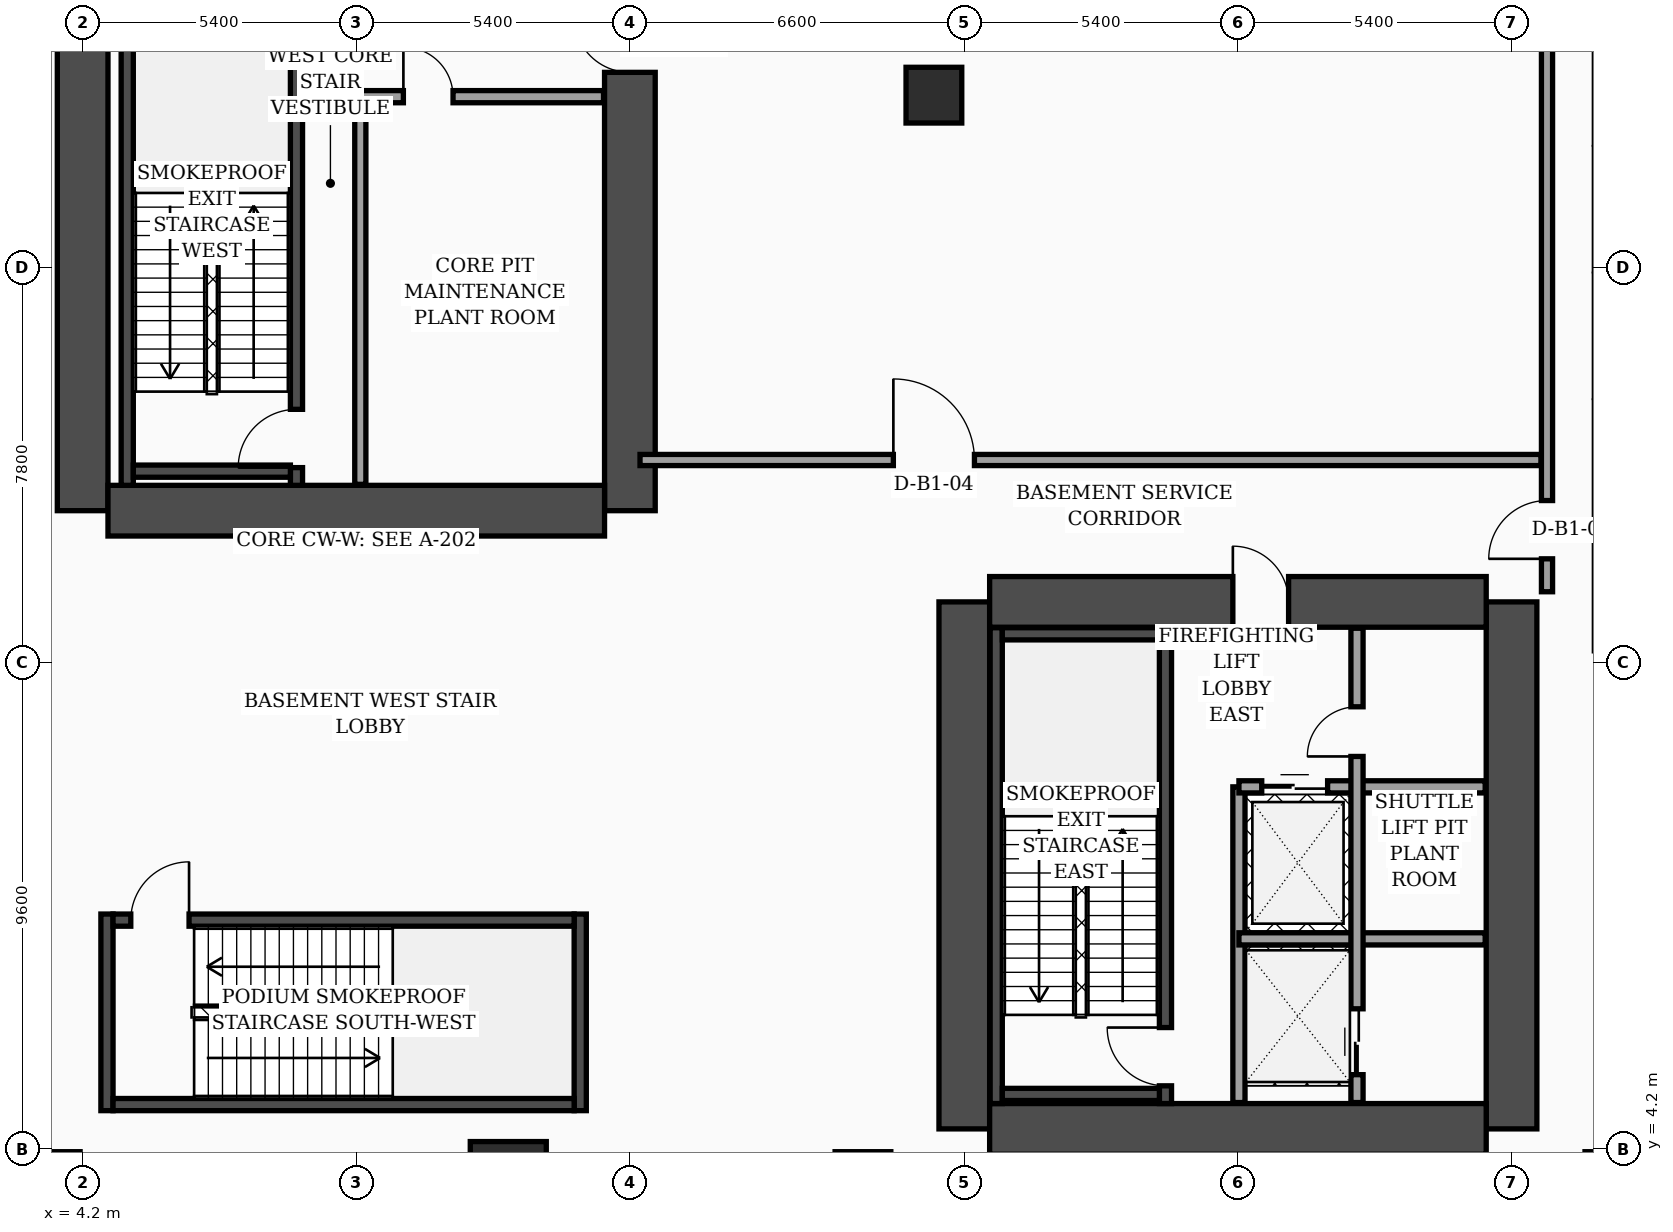
"""IFC4 building model, lengths in metres.
Left out: names, types, materials, properties, quantities, classifications, styles, units other than length and angle.
Written with IfcOpenShell. Run it as: python <this file> out.ifc"""

import sys

from ifc_helpers import new_model, si_unit, direction, frame, frame_2d, origin, origin_2d, place, context, subcontext, project, spatial, rectangle, hollow_rectangle, extrude, element, fill, save


model = new_model("IFC4")
c1 = context("Model", 3, precision=1e-05, world=origin(), true_north=direction((0.0, 1.0)))
c2 = subcontext(c1, "Body", "Model", "MODEL_VIEW")
j1 = project(units=[si_unit("LENGTHUNIT", "METRE"), si_unit("PLANEANGLEUNIT", "RADIAN")], contexts=[c1])
p1 = place(None, origin())
s1 = spatial("IfcSite", under=j1, at=p1, CompositionType="ELEMENT")
p2 = place(p1, origin())
s2 = spatial("IfcBuilding", under=s1, at=p2, CompositionType="ELEMENT")
p3 = place(p2, frame((0.0, 0.0, -5.2)))
s3 = spatial("IfcBuildingStorey", under=s2, at=p3, CompositionType="ELEMENT", Elevation=-5.2)
p4 = place(p3, frame((4.2, 16.8, 0.0), z_axis=(0.0, 0.0, 1.0), x_axis=(0.0, 1.0, 0.0)))
e1 = element("IfcWall", 1, at=p4, inside=s3, PredefinedType="SHEAR", context=c2, shape_type="SweptSolid", body=[
    extrude(rectangle(XDim=21.6, YDim=1.0, at=frame_2d((10.8, 0.0))), origin(), (0.0, 0.0, 1.0), 4.88),
])
p5 = place(p3, frame((15.0, 16.8, 0.0), z_axis=(0.0, 0.0, 1.0), x_axis=(0.0, 1.0, 0.0)))
e2 = element("IfcWall", 2, at=p5, inside=s3, PredefinedType="SHEAR", context=c2, shape_type="SweptSolid", body=[
    extrude(rectangle(XDim=21.6, YDim=1.0, at=frame_2d((10.8, 0.0))), origin(), (0.0, 0.0, 1.0), 4.88),
])
p6 = place(p5, frame((8.65, 0.0, 0.0)))
e3 = element("IfcOpeningElement", 3, at=p6, cuts=e2, PredefinedType="OPENING", context=c2, shape_type="SweptSolid", body=[
    extrude(rectangle(XDim=1.1, YDim=2.2, at=frame_2d((0.55, 1.1))), frame((0.0, 0.51, 0.0), z_axis=(0.0, -1.0, 0.0), x_axis=(1.0, 0.0, 0.0)), (0.0, 0.0, 1.0), 1.02),
])
p7 = place(p3, frame((4.7, 16.8, 0.0), z_axis=(0.0, 0.0, 1.0), x_axis=(1.0, 0.0, 0.0)))
e4 = element("IfcWall", 4, at=p7, inside=s3, PredefinedType="SHEAR", context=c2, shape_type="SweptSolid", body=[
    extrude(rectangle(XDim=9.8, YDim=1.0, at=frame_2d((4.9, 0.0))), origin(), (0.0, 0.0, 1.0), 4.88),
])
for number, where, z_axis, x_axis in (
    (5, (21.6, 4.6, 0.0), (0.0, 0.0, 1.0), (0.0, 1.0, 0.0)),
    (6, (32.4, 4.6, 0.0), (0.0, 0.0, 1.0), (0.0, 1.0, 0.0)),
):
    element("IfcWall", number, at=place(p3, frame(where, z_axis=z_axis, x_axis=x_axis)), inside=s3, PredefinedType="SHEAR", context=c2, shape_type="SweptSolid", body=[
        extrude(rectangle(XDim=10.4, YDim=1.0, at=frame_2d((5.2, 0.0))), origin(), (0.0, 0.0, 1.0), 4.88),
    ])
p8 = place(p3, frame((22.1, 15.0, 0.0), z_axis=(0.0, 0.0, 1.0), x_axis=(1.0, 0.0, 0.0)))
e7 = element("IfcWall", 7, at=p8, inside=s3, PredefinedType="SHEAR", context=c2, shape_type="SweptSolid", body=[
    extrude(rectangle(XDim=9.8, YDim=1.0, at=frame_2d((4.9, 0.0))), origin(), (0.0, 0.0, 1.0), 4.88),
])
p9 = place(p8, frame((4.8, 0.0, 0.0)))
e8 = element("IfcOpeningElement", 8, at=p9, cuts=e7, PredefinedType="OPENING", context=c2, shape_type="SweptSolid", body=[
    extrude(rectangle(XDim=1.1, YDim=2.2, at=frame_2d((0.55, 1.1))), frame((0.0, 0.51, 0.0), z_axis=(0.0, -1.0, 0.0), x_axis=(1.0, 0.0, 0.0)), (0.0, 0.0, 1.0), 1.02),
])
p10 = place(p3, frame((22.1, 4.6, 0.0), z_axis=(0.0, 0.0, 1.0), x_axis=(1.0, 0.0, 0.0)))
e9 = element("IfcWall", 9, at=p10, inside=s3, PredefinedType="SHEAR", context=c2, shape_type="SweptSolid", body=[
    extrude(rectangle(XDim=9.8, YDim=1.0, at=frame_2d((4.9, 0.0))), origin(), (0.0, 0.0, 1.0), 4.88),
])
p11 = place(p3, frame((5.08, 17.3, 0.0), z_axis=(0.0, 0.0, 1.0), x_axis=(0.0, 1.0, 0.0)))
e10 = element("IfcWall", 10, at=p11, inside=s3, PredefinedType="SOLIDWALL", context=c2, shape_type="SweptSolid", body=[
    extrude(rectangle(XDim=9.49, YDim=0.24, at=frame_2d((4.745, 0.0))), origin(), (0.0, 0.0, 1.0), 4.88),
])
p12 = place(p3, frame((8.42, 17.3, 0.0), z_axis=(0.0, 0.0, 1.0), x_axis=(0.0, 1.0, 0.0)))
e11 = element("IfcWall", 11, at=p12, inside=s3, PredefinedType="SOLIDWALL", context=c2, shape_type="SweptSolid", body=[
    extrude(rectangle(XDim=9.49, YDim=0.24, at=frame_2d((4.745, 0.0))), origin(), (0.0, 0.0, 1.0), 4.88),
])
p13 = place(p12, frame((0.35, 0.0, 0.0)))
e12 = element("IfcOpeningElement", 12, at=p13, cuts=e11, PredefinedType="OPENING", context=c2, shape_type="SweptSolid", body=[
    extrude(rectangle(XDim=1.15, YDim=2.2, at=frame_2d((0.575, 1.1))), frame((0.0, 0.13, 0.0), z_axis=(0.0, -1.0, 0.0), x_axis=(1.0, 0.0, 0.0)), (0.0, 0.0, 1.0), 0.26),
])
p14 = place(p3, frame((5.2, 17.58, 0.0), z_axis=(0.0, 0.0, 1.0), x_axis=(1.0, 0.0, 0.0)))
e13 = element("IfcWall", 13, at=p14, inside=s3, PredefinedType="SOLIDWALL", context=c2, shape_type="SweptSolid", body=[
    extrude(rectangle(XDim=3.1, YDim=0.24, at=frame_2d((1.55, 0.0))), origin(), (0.0, 0.0, 1.0), 4.88),
])
p15 = place(p3, frame((22.23, 5.1, 0.0), z_axis=(0.0, 0.0, 1.0), x_axis=(0.0, 1.0, 0.0)))
e14 = element("IfcWall", 14, at=p15, inside=s3, PredefinedType="SOLIDWALL", context=c2, shape_type="SweptSolid", body=[
    extrude(rectangle(XDim=9.39, YDim=0.24, at=frame_2d((4.695, 0.0))), origin(), (0.0, 0.0, 1.0), 4.88),
])
p16 = place(p3, frame((25.57, 5.1, 0.0), z_axis=(0.0, 0.0, 1.0), x_axis=(0.0, 1.0, 0.0)))
e15 = element("IfcWall", 15, at=p16, inside=s3, PredefinedType="SOLIDWALL", context=c2, shape_type="SweptSolid", body=[
    extrude(rectangle(XDim=9.39, YDim=0.24, at=frame_2d((4.695, 0.0))), origin(), (0.0, 0.0, 1.0), 4.88),
])
p17 = place(p16, frame((0.35, 0.0, 0.0)))
e16 = element("IfcOpeningElement", 16, at=p17, cuts=e15, PredefinedType="OPENING", context=c2, shape_type="SweptSolid", body=[
    extrude(rectangle(XDim=1.15, YDim=2.2, at=frame_2d((0.575, 1.1))), frame((0.0, 0.13, 0.0), z_axis=(0.0, -1.0, 0.0), x_axis=(1.0, 0.0, 0.0)), (0.0, 0.0, 1.0), 0.26),
])
for number, where, z_axis, x_axis in (
    (17, (22.35, 5.28, 0.0), (0.0, 0.0, 1.0), (1.0, 0.0, 0.0)),
    (18, (22.35, 14.37, 0.0), (0.0, 0.0, 1.0), (1.0, 0.0, 0.0)),
):
    element("IfcWall", number, at=place(p3, frame(where, z_axis=z_axis, x_axis=x_axis)), inside=s3, PredefinedType="SOLIDWALL", context=c2, shape_type="SweptSolid", body=[
        extrude(rectangle(XDim=3.1, YDim=0.24, at=frame_2d((1.55, 0.0))), origin(), (0.0, 0.0, 1.0), 4.88),
    ])
for number, where, z_axis, x_axis in (
    (19, (4.68, 4.96, 0.0), (0.0, 0.0, 1.0), (0.0, 1.0, 0.0)),
    (20, (14.02, 4.96, 0.0), (0.0, 0.0, 1.0), (0.0, 1.0, 0.0)),
):
    element("IfcWall", number, at=place(p3, frame(where, z_axis=z_axis, x_axis=x_axis)), inside=s3, PredefinedType="SOLIDWALL", context=c2, shape_type="SweptSolid", body=[
        extrude(rectangle(XDim=3.88, YDim=0.24, at=frame_2d((1.94, 0.0))), origin(), (0.0, 0.0, 1.0), 4.88),
    ])
p18 = place(p3, frame((4.8, 5.08, 0.0), z_axis=(0.0, 0.0, 1.0), x_axis=(1.0, 0.0, 0.0)))
e21 = element("IfcWall", 21, at=p18, inside=s3, PredefinedType="SOLIDWALL", context=c2, shape_type="SweptSolid", body=[
    extrude(rectangle(XDim=9.1, YDim=0.24, at=frame_2d((4.55, 0.0))), origin(), (0.0, 0.0, 1.0), 4.88),
])
p19 = place(p3, frame((4.8, 8.72, 0.0), z_axis=(0.0, 0.0, 1.0), x_axis=(1.0, 0.0, 0.0)))
e22 = element("IfcWall", 22, at=p19, inside=s3, PredefinedType="SOLIDWALL", context=c2, shape_type="SweptSolid", body=[
    extrude(rectangle(XDim=9.1, YDim=0.24, at=frame_2d((4.55, 0.0))), origin(), (0.0, 0.0, 1.0), 4.88),
])
p20 = place(p19, frame((0.35, 0.0, 0.0)))
e23 = element("IfcOpeningElement", 23, at=p20, cuts=e22, PredefinedType="OPENING", context=c2, shape_type="SweptSolid", body=[
    extrude(rectangle(XDim=1.15, YDim=2.2, at=frame_2d((0.575, 1.1))), frame((0.0, 0.13, 0.0), z_axis=(0.0, -1.0, 0.0), x_axis=(1.0, 0.0, 0.0)), (0.0, 0.0, 1.0), 0.26),
])
p21 = place(p3, frame((3.6, 3.6, 0.0), z_axis=(0.0, 0.0, 1.0), x_axis=(1.0, 0.0, 0.0)))
e24 = element("IfcColumn", 24, at=p21, inside=s3, PredefinedType="COLUMN", context=c2, shape_type="SweptSolid", body=[
    extrude(hollow_rectangle(XDim=1.1, YDim=1.1, WallThickness=0.045, at=origin_2d()), origin(), (0.0, 0.0, 1.0), 4.88),
])
p22 = place(p3, frame((12.6, 3.6, 0.0), z_axis=(0.0, 0.0, 1.0), x_axis=(1.0, 0.0, 0.0)))
e25 = element("IfcColumn", 25, at=p22, inside=s3, PredefinedType="COLUMN", context=c2, shape_type="SweptSolid", body=[
    extrude(rectangle(XDim=1.5, YDim=1.5, at=origin_2d()), origin(), (0.0, 0.0, 1.0), 4.88),
])
for number, where, z_axis, x_axis in (
    (26, (21.0, 25.0, 0.0), (0.0, 0.0, 1.0), (1.0, 0.0, 0.0)),
    (27, (19.6, 3.6, 0.0), (0.0, 0.0, 1.0), (1.0, 0.0, 0.0)),
    (28, (34.4, 3.6, 0.0), (0.0, 0.0, 1.0), (1.0, 0.0, 0.0)),
):
    element("IfcColumn", number, at=place(p3, frame(where, z_axis=z_axis, x_axis=x_axis)), inside=s3, PredefinedType="COLUMN", context=c2, shape_type="SweptSolid", body=[
        extrude(hollow_rectangle(XDim=1.1, YDim=1.1, WallThickness=0.045, at=origin_2d()), origin(), (0.0, 0.0, 1.0), 4.88),
    ])
p23 = place(p3, frame((9.68, 17.32, 0.0), z_axis=(0.0, 0.0, 1.0), x_axis=(0.0, 1.0, 0.0)))
e29 = element("IfcWall", 29, at=p23, inside=s3, PredefinedType="SOLIDWALL", context=c2, shape_type="SweptSolid", body=[
    extrude(rectangle(XDim=7.68, YDim=0.22, at=frame_2d((3.84, 0.0))), origin(), (0.0, 0.0, 1.0), 4.88),
])
p24 = place(p3, frame((9.68, 24.97, 0.0), z_axis=(0.0, 0.0, 1.0), x_axis=(1.0, 0.0, 0.0)))
e30 = element("IfcWall", 30, at=p24, inside=s3, PredefinedType="SOLIDWALL", context=c2, shape_type="SweptSolid", body=[
    extrude(rectangle(XDim=4.8, YDim=0.24, at=frame_2d((2.4, 0.0))), origin(), (0.0, 0.0, 1.0), 4.08),
])
p25 = place(p24, frame((0.85, 0.0, 0.0)))
e31 = element("IfcOpeningElement", 31, at=p25, cuts=e30, PredefinedType="OPENING", context=c2, shape_type="SweptSolid", body=[
    extrude(rectangle(XDim=0.98, YDim=2.15, at=frame_2d((0.49, 1.075))), frame((0.0, 0.13, 0.0), z_axis=(0.0, -1.0, 0.0), x_axis=(1.0, 0.0, 0.0)), (0.0, 0.0, 1.0), 0.26),
])
p26 = place(p3, frame((27.02, 5.12, 0.0), z_axis=(0.0, 0.0, 1.0), x_axis=(0.0, 1.0, 0.0)))
e32 = element("IfcWall", 32, at=p26, inside=s3, PredefinedType="SOLIDWALL", context=c2, shape_type="SweptSolid", body=[
    extrude(rectangle(XDim=6.23, YDim=0.24, at=frame_2d((3.115, 0.0))), origin(), (0.0, 0.0, 1.0), 4.88),
])
p27 = place(p3, frame((27.02, 11.35, 0.0), z_axis=(0.0, 0.0, 1.0), x_axis=(1.0, 0.0, 0.0)))
e33 = element("IfcWall", 33, at=p27, inside=s3, PredefinedType="SOLIDWALL", context=c2, shape_type="SweptSolid", body=[
    extrude(rectangle(XDim=4.86, YDim=0.24, at=frame_2d((2.43, 0.0))), origin(), (0.0, 0.0, 1.0), 4.88),
])
p28 = place(p27, frame((0.45, 0.0, 0.0)))
e34 = element("IfcOpeningElement", 34, at=p28, cuts=e33, PredefinedType="OPENING", context=c2, shape_type="SweptSolid", body=[
    extrude(rectangle(XDim=1.3, YDim=2.35, at=frame_2d((0.65, 1.175))), frame((0.0, 0.13, 0.0), z_axis=(0.0, -1.0, 0.0), x_axis=(1.0, 0.0, 0.0)), (0.0, 0.0, 1.0), 0.26),
])
p29 = place(p3, frame((27.02, 8.35, 0.0), z_axis=(0.0, 0.0, 1.0), x_axis=(1.0, 0.0, 0.0)))
e35 = element("IfcWall", 35, at=p29, inside=s3, PredefinedType="SOLIDWALL", context=c2, shape_type="SweptSolid", body=[
    extrude(rectangle(XDim=4.86, YDim=0.24, at=frame_2d((2.43, 0.0))), origin(), (0.0, 0.0, 1.0), 4.88),
])
p30 = place(p3, frame((29.35, 5.12, 0.0), z_axis=(0.0, 0.0, 1.0), x_axis=(0.0, 1.0, 0.0)))
e36 = element("IfcWall", 36, at=p30, inside=s3, PredefinedType="SOLIDWALL", context=c2, shape_type="SweptSolid", body=[
    extrude(rectangle(XDim=9.36, YDim=0.24, at=frame_2d((4.68, 0.0))), origin(), (0.0, 0.0, 1.0), 4.88),
])
p31 = place(p30, frame((0.55, 0.0, 0.0)))
e37 = element("IfcOpeningElement", 37, at=p31, cuts=e36, PredefinedType="OPENING", context=c2, shape_type="SweptSolid", body=[
    extrude(rectangle(XDim=1.3, YDim=2.35, at=frame_2d((0.65, 1.175))), frame((0.0, 0.13, 0.0), z_axis=(0.0, -1.0, 0.0), x_axis=(1.0, 0.0, 0.0)), (0.0, 0.0, 1.0), 0.26),
])
p32 = place(p30, frame((6.83, 0.0, 0.0)))
e38 = element("IfcOpeningElement", 38, at=p32, cuts=e36, PredefinedType="OPENING", context=c2, shape_type="SweptSolid", body=[
    extrude(rectangle(XDim=0.98, YDim=2.15, at=frame_2d((0.49, 1.075))), frame((0.0, 0.13, 0.0), z_axis=(0.0, -1.0, 0.0), x_axis=(1.0, 0.0, 0.0)), (0.0, 0.0, 1.0), 0.26),
])
p33 = place(p3, frame((33.1, 15.2, 0.0), z_axis=(0.0, 0.0, 1.0), x_axis=(0.0, 1.0, 0.0)))
e39 = element("IfcWall", 39, at=p33, inside=s3, PredefinedType="SOLIDWALL", context=c2, shape_type="SweptSolid", body=[
    extrude(rectangle(XDim=42.38, YDim=0.22, at=frame_2d((21.19, 0.0))), origin(), (0.0, 0.0, 1.0), 4.08),
])
p34 = place(p33, frame((0.65, 0.0, 0.0)))
e40 = element("IfcOpeningElement", 40, at=p34, cuts=e39, PredefinedType="OPENING", context=c2, shape_type="SweptSolid", body=[
    extrude(rectangle(XDim=1.15, YDim=2.2, at=frame_2d((0.575, 1.1))), frame((0.0, 0.12, 0.0), z_axis=(0.0, -1.0, 0.0), x_axis=(1.0, 0.0, 0.0)), (0.0, 0.0, 1.0), 0.24),
])
p35 = place(p33, frame((24.2, 0.0, 0.0)))
e41 = element("IfcOpeningElement", 41, at=p35, cuts=e39, PredefinedType="OPENING", context=c2, shape_type="SweptSolid", body=[
    extrude(rectangle(XDim=1.02, YDim=2.2, at=frame_2d((0.51, 1.1))), frame((0.0, 0.12, 0.0), z_axis=(0.0, -1.0, 0.0), x_axis=(1.0, 0.0, 0.0)), (0.0, 0.0, 1.0), 0.24),
])
p36 = place(p33, frame((29.4, 0.0, 0.0)))
e42 = element("IfcOpeningElement", 42, at=p36, cuts=e39, PredefinedType="OPENING", context=c2, shape_type="SweptSolid", body=[
    extrude(rectangle(XDim=0.98, YDim=2.15, at=frame_2d((0.49, 1.075))), frame((0.0, 0.12, 0.0), z_axis=(0.0, -1.0, 0.0), x_axis=(1.0, 0.0, 0.0)), (0.0, 0.0, 1.0), 0.24),
])
p37 = place(p3, frame((15.2, 17.8, 0.0), z_axis=(0.0, 0.0, 1.0), x_axis=(1.0, 0.0, 0.0)))
e43 = element("IfcWall", 43, at=p37, inside=s3, PredefinedType="SOLIDWALL", context=c2, shape_type="SweptSolid", body=[
    extrude(rectangle(XDim=17.78, YDim=0.22, at=frame_2d((8.89, 0.0))), origin(), (0.0, 0.0, 1.0), 4.88),
])
p38 = place(p37, frame((5.0, 0.0, 0.0)))
e44 = element("IfcOpeningElement", 44, at=p38, cuts=e43, PredefinedType="OPENING", context=c2, shape_type="SweptSolid", body=[
    extrude(rectangle(XDim=1.6, YDim=2.35, at=frame_2d((0.8, 1.175))), frame((0.0, 0.12, 0.0), z_axis=(0.0, -1.0, 0.0), x_axis=(1.0, 0.0, 0.0)), (0.0, 0.0, 1.0), 0.24),
])
p39 = place(p25, origin())
e45 = element("IfcDoor", 45, at=p39, inside=s3, OperationType="SINGLE_SWING_LEFT", PredefinedType="DOOR", context=c2, shape_type="SweptSolid", body=[
    extrude(rectangle(XDim=0.98, YDim=2.15, at=frame_2d((0.49, 1.075))), frame((0.0, 0.025, 0.0), z_axis=(0.0, -1.0, 0.0), x_axis=(1.0, 0.0, 0.0)), (0.0, 0.0, 1.0), 0.05),
])
fill(e31, e45)
p40 = place(p28, origin())
e46 = element("IfcDoor", 46, at=p40, inside=s3, OperationType="DOUBLE_DOOR_SLIDING", PredefinedType="DOOR", context=c2, shape_type="SweptSolid", body=[
    extrude(rectangle(XDim=1.3, YDim=2.35, at=frame_2d((0.65, 1.175))), frame((0.0, 0.025, 0.0), z_axis=(0.0, -1.0, 0.0), x_axis=(1.0, 0.0, 0.0)), (0.0, 0.0, 1.0), 0.05),
])
fill(e34, e46)
p41 = place(p31, origin())
e47 = element("IfcDoor", 47, at=p41, inside=s3, OperationType="DOUBLE_DOOR_SLIDING", PredefinedType="DOOR", context=c2, shape_type="SweptSolid", body=[
    extrude(rectangle(XDim=1.3, YDim=2.35, at=frame_2d((0.65, 1.175))), frame((0.0, 0.025, 0.0), z_axis=(0.0, -1.0, 0.0), x_axis=(1.0, 0.0, 0.0)), (0.0, 0.0, 1.0), 0.05),
])
fill(e37, e47)
p42 = place(p32, origin())
e48 = element("IfcDoor", 48, at=p42, inside=s3, OperationType="SINGLE_SWING_LEFT", PredefinedType="DOOR", context=c2, shape_type="SweptSolid", body=[
    extrude(rectangle(XDim=0.98, YDim=2.15, at=frame_2d((0.49, 1.075))), frame((0.0, 0.025, 0.0), z_axis=(0.0, -1.0, 0.0), x_axis=(1.0, 0.0, 0.0)), (0.0, 0.0, 1.0), 0.05),
])
fill(e38, e48)
p43 = place(p34, origin())
e49 = element("IfcDoor", 49, at=p43, inside=s3, OperationType="SINGLE_SWING_LEFT", PredefinedType="DOOR", context=c2, shape_type="SweptSolid", body=[
    extrude(rectangle(XDim=1.15, YDim=2.2, at=frame_2d((0.575, 1.1))), frame((0.0, 0.025, 0.0), z_axis=(0.0, -1.0, 0.0), x_axis=(1.0, 0.0, 0.0)), (0.0, 0.0, 1.0), 0.05),
])
fill(e40, e49)
p44 = place(p38, origin())
e50 = element("IfcDoor", 50, at=p44, inside=s3, OperationType="SINGLE_SWING_LEFT", PredefinedType="DOOR", context=c2, shape_type="SweptSolid", body=[
    extrude(rectangle(XDim=1.6, YDim=2.35, at=frame_2d((0.8, 1.175))), frame((0.0, 0.025, 0.0), z_axis=(0.0, -1.0, 0.0), x_axis=(1.0, 0.0, 0.0)), (0.0, 0.0, 1.0), 0.05),
])
fill(e44, e50)
p45 = place(p13, origin())
e51 = element("IfcDoor", 51, at=p45, inside=s3, OperationType="SINGLE_SWING_LEFT", PredefinedType="DOOR", context=c2, shape_type="SweptSolid", body=[
    extrude(rectangle(XDim=1.15, YDim=2.2, at=frame_2d((0.575, 1.1))), frame((0.0, 0.025, 0.0), z_axis=(0.0, -1.0, 0.0), x_axis=(1.0, 0.0, 0.0)), (0.0, 0.0, 1.0), 0.05),
])
fill(e12, e51)
p46 = place(p17, origin())
e52 = element("IfcDoor", 52, at=p46, inside=s3, OperationType="SINGLE_SWING_RIGHT", PredefinedType="DOOR", context=c2, shape_type="SweptSolid", body=[
    extrude(rectangle(XDim=1.15, YDim=2.2, at=frame_2d((0.575, 1.1))), frame((0.0, 0.025, 0.0), z_axis=(0.0, -1.0, 0.0), x_axis=(1.0, 0.0, 0.0)), (0.0, 0.0, 1.0), 0.05),
])
fill(e16, e52)
p47 = place(p20, origin())
e53 = element("IfcDoor", 53, at=p47, inside=s3, OperationType="SINGLE_SWING_RIGHT", PredefinedType="DOOR", context=c2, shape_type="SweptSolid", body=[
    extrude(rectangle(XDim=1.15, YDim=2.2, at=frame_2d((0.575, 1.1))), frame((0.0, 0.025, 0.0), z_axis=(0.0, -1.0, 0.0), x_axis=(1.0, 0.0, 0.0)), (0.0, 0.0, 1.0), 0.05),
])
fill(e23, e53)
p48 = place(p6, origin())
e54 = element("IfcDoor", 54, at=p48, inside=s3, OperationType="SINGLE_SWING_RIGHT", PredefinedType="DOOR", context=c2, shape_type="SweptSolid", body=[
    extrude(rectangle(XDim=1.1, YDim=2.2, at=frame_2d((0.55, 1.1))), frame((0.0, 0.025, 0.0), z_axis=(0.0, -1.0, 0.0), x_axis=(1.0, 0.0, 0.0)), (0.0, 0.0, 1.0), 0.05),
])
fill(e3, e54)
p49 = place(p9, origin())
e55 = element("IfcDoor", 55, at=p49, inside=s3, OperationType="SINGLE_SWING_LEFT", PredefinedType="DOOR", context=c2, shape_type="SweptSolid", body=[
    extrude(rectangle(XDim=1.1, YDim=2.2, at=frame_2d((0.55, 1.1))), frame((0.0, 0.025, 0.0), z_axis=(0.0, -1.0, 0.0), x_axis=(1.0, 0.0, 0.0)), (0.0, 0.0, 1.0), 0.05),
])
fill(e8, e55)
save(model, sys.argv[1])
